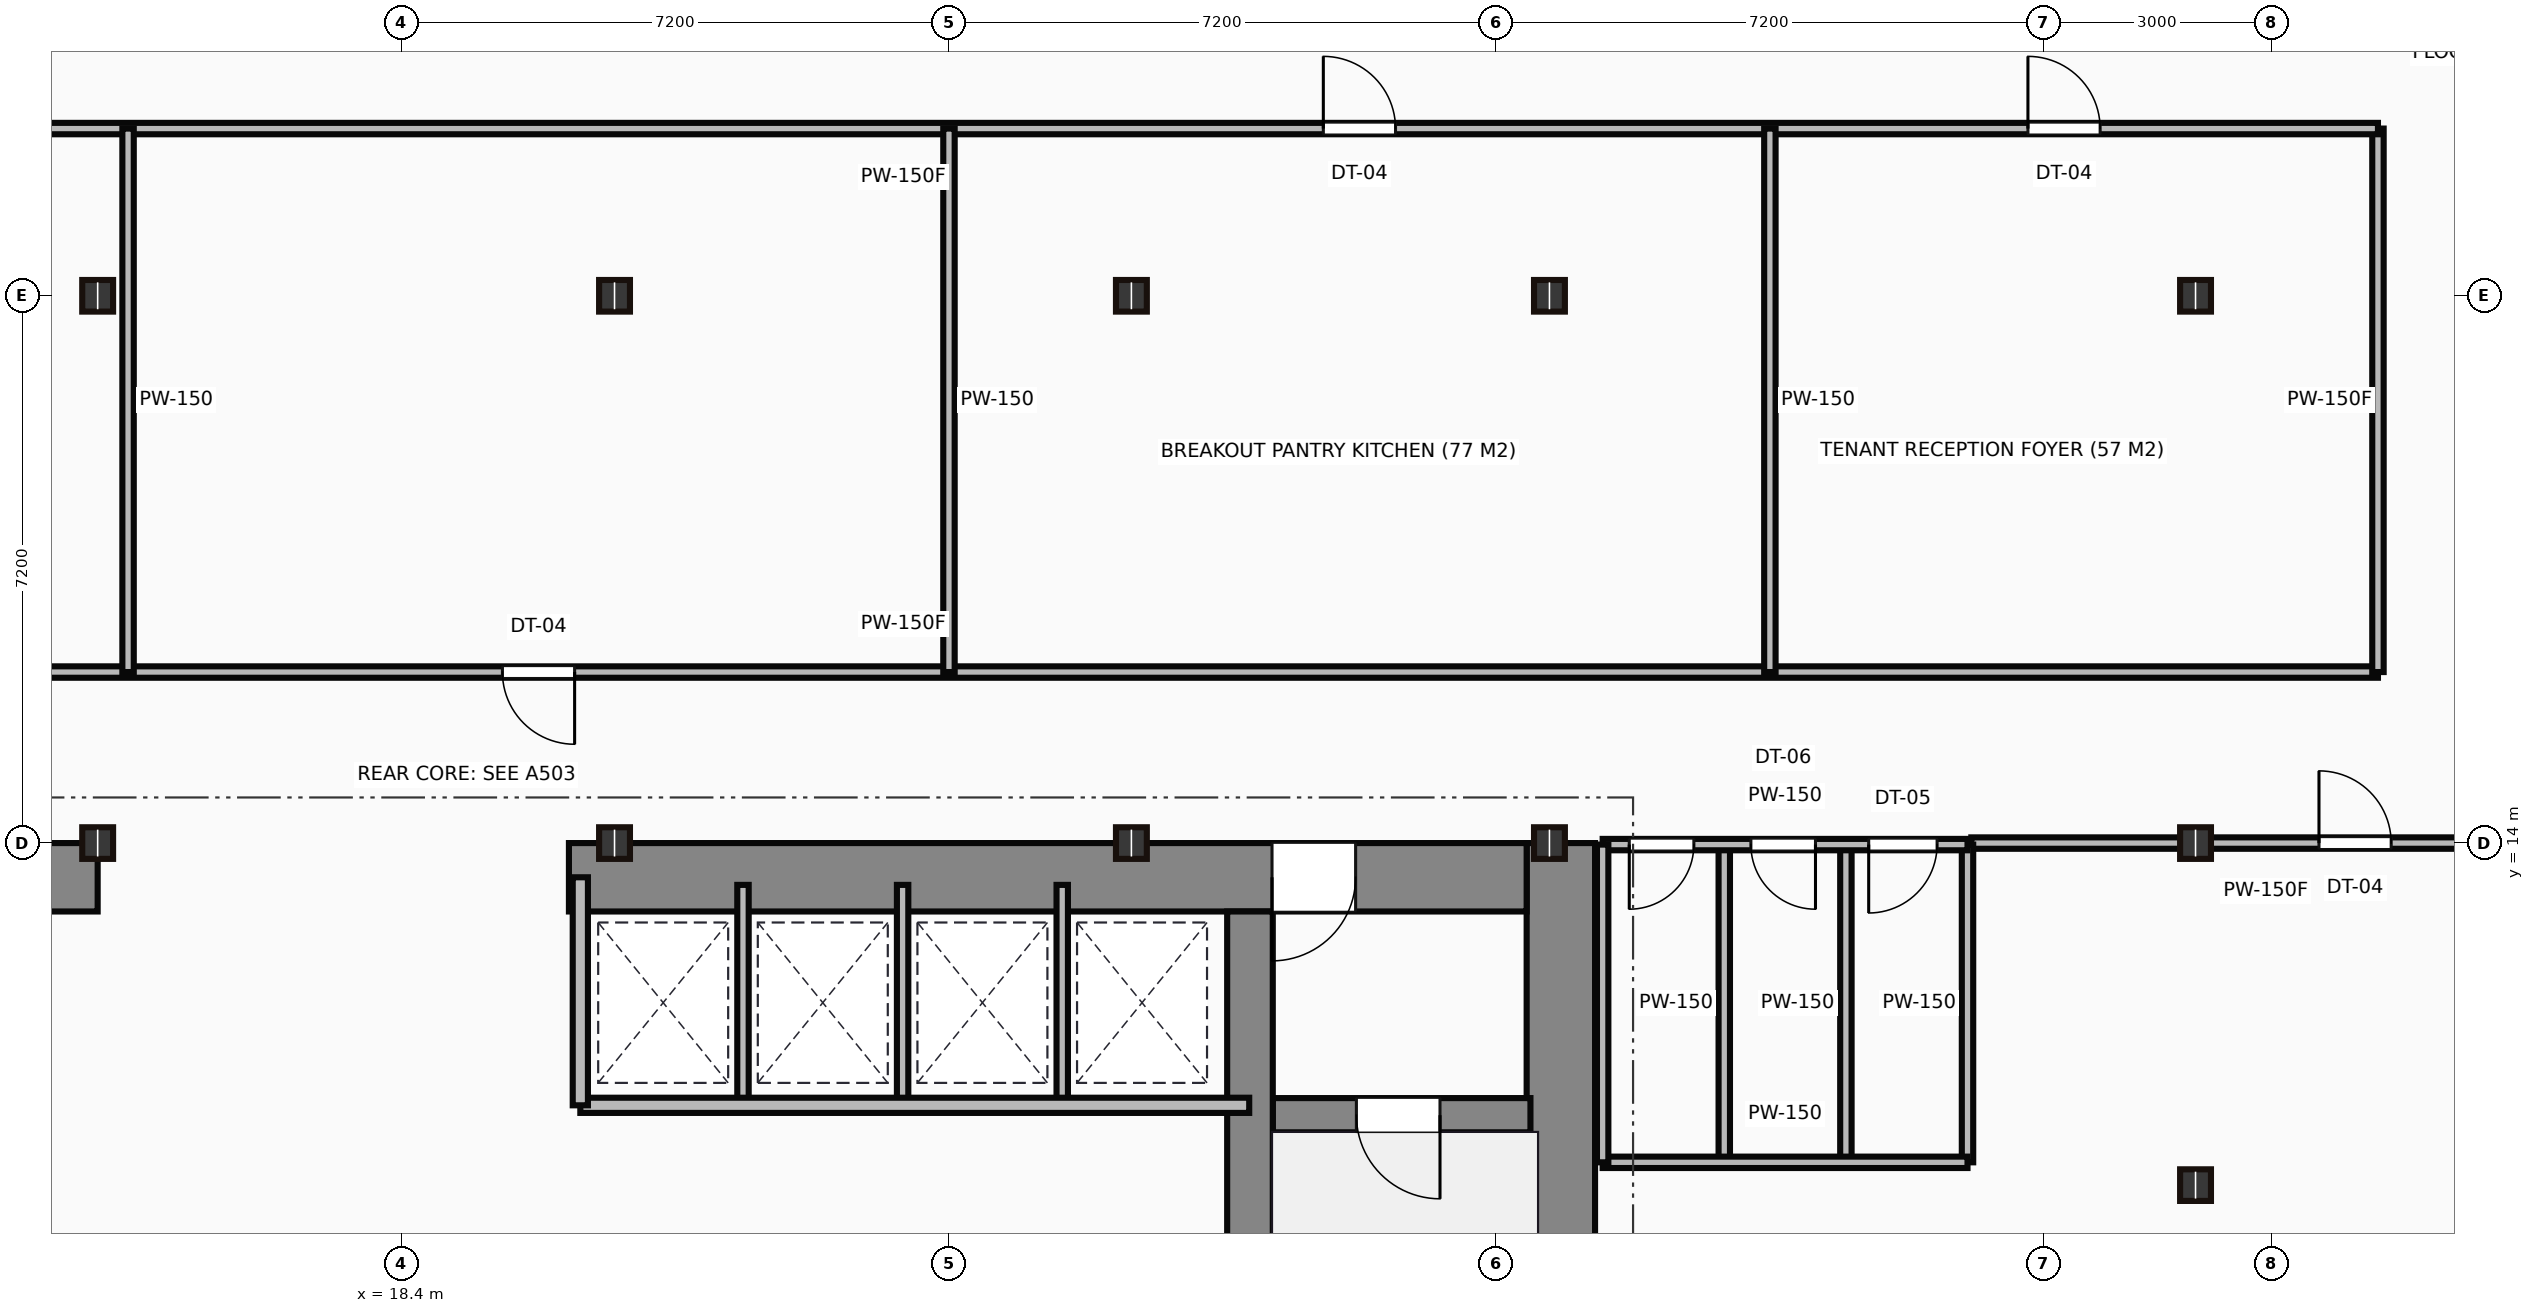
"""IFC4 building model, lengths in metres.
Left out: names, types, materials, properties, quantities, classifications, styles, units other than length and angle.
Written with IfcOpenShell. Run it as: python <this file> out.ifc"""

import sys

from ifc_helpers import new_model, si_unit, direction, frame, frame_2d, origin, origin_2d, place, context, subcontext, project, spatial, rectangle, i_section, extrude, source, transform, mapped, element, fill, save


model = new_model("IFC4")
c1 = context("Model", 3, precision=1e-05, world=origin(), true_north=direction((0.0, 1.0)))
c2 = subcontext(c1, "Body", "Model", "MODEL_VIEW")
j1 = project(units=[si_unit("LENGTHUNIT", "METRE"), si_unit("PLANEANGLEUNIT", "RADIAN")], contexts=[c1])
p1 = place(None, origin())
s1 = spatial("IfcSite", under=j1, at=p1, CompositionType="ELEMENT")
p2 = place(p1, origin())
s2 = spatial("IfcBuilding", under=s1, at=p2, CompositionType="ELEMENT")
p3 = place(p2, frame((0.0, 0.0, 50.75)))
s3 = spatial("IfcBuildingStorey", under=s2, at=p3, CompositionType="ELEMENT", Elevation=50.75)
m1 = source(origin(), c2, "Body", "SweptSolid", [
    extrude(rectangle(XDim=13.1, YDim=0.9, at=frame_2d((6.55, 0.0))), origin(), (0.0, 0.0, 1.0), 3.65),
])
p4 = place(p3, frame((33.65, 0.9, 0.0), z_axis=(0.0, 0.0, 1.0), x_axis=(0.0, 1.0, 0.0)))
e1 = element("IfcWall", 1, at=p4, inside=s3, PredefinedType="SHEAR", context=c2, shape_type="MappedRepresentation", body=[
    mapped(m1, transform((0.0, 0.0, 0.0))),
])
m2 = source(origin(), c2, "Body", "SweptSolid", [
    extrude(rectangle(XDim=9.1, YDim=0.9, at=frame_2d((4.55, 0.0))), origin(), (0.0, 0.0, 1.0), 3.65),
])
p5 = place(p3, frame((5.3, 13.55, 0.0), z_axis=(0.0, 0.0, 1.0), x_axis=(1.0, 0.0, 0.0)))
e2 = element("IfcWall", 2, at=p5, inside=s3, PredefinedType="SHEAR", context=c2, shape_type="MappedRepresentation", body=[
    mapped(m2, transform((0.0, 0.0, 0.0))),
])
p6 = place(p5, frame((4.1, 0.0, 0.0)))
e3 = element("IfcOpeningElement", 3, at=p6, cuts=e2, PredefinedType="OPENING", context=c2, shape_type="SweptSolid", body=[
    extrude(rectangle(XDim=1.1, YDim=2.15, at=frame_2d((0.55, 1.075))), frame((0.0, 0.46, 0.0), z_axis=(0.0, -1.0, 0.0), x_axis=(1.0, 0.0, 0.0)), (0.0, 0.0, 1.0), 0.92),
])
m3 = source(origin(), c2, "Body", "SweptSolid", [
    extrude(rectangle(XDim=12.6, YDim=0.9, at=frame_2d((6.3, 0.0))), origin(), (0.0, 0.0, 1.0), 3.65),
])
p7 = place(p3, frame((20.6, 13.55, 0.0), z_axis=(0.0, 0.0, 1.0), x_axis=(1.0, 0.0, 0.0)))
e4 = element("IfcWall", 4, at=p7, inside=s3, PredefinedType="SHEAR", context=c2, shape_type="MappedRepresentation", body=[
    mapped(m3, transform((0.0, 0.0, 0.0))),
])
p8 = place(p7, frame((9.25, 0.0, 0.0)))
e5 = element("IfcOpeningElement", 5, at=p8, cuts=e4, PredefinedType="OPENING", context=c2, shape_type="SweptSolid", body=[
    extrude(rectangle(XDim=1.1, YDim=2.15, at=frame_2d((0.55, 1.075))), frame((0.0, 0.46, 0.0), z_axis=(0.0, -1.0, 0.0), x_axis=(1.0, 0.0, 0.0)), (0.0, 0.0, 1.0), 0.92),
])
m4 = source(origin(), c2, "Body", "SweptSolid", [
    extrude(rectangle(XDim=12.2, YDim=0.6, at=frame_2d((6.1, 0.0))), origin(), (0.0, 0.0, 1.0), 3.65),
])
p9 = place(p3, frame((29.56, 0.9, 0.0), z_axis=(0.0, 0.0, 1.0), x_axis=(0.0, 1.0, 0.0)))
e6 = element("IfcWall", 6, at=p9, inside=s3, PredefinedType="SHEAR", context=c2, shape_type="MappedRepresentation", body=[
    mapped(m4, transform((0.0, 0.0, 0.0))),
])
m5 = source(origin(), c2, "Body", "SweptSolid", [
    extrude(rectangle(XDim=3.39, YDim=0.45, at=frame_2d((1.695, 0.0))), origin(), (0.0, 0.0, 1.0), 3.65),
])
p10 = place(p3, frame((29.86, 10.42, 0.0), z_axis=(0.0, 0.0, 1.0), x_axis=(1.0, 0.0, 0.0)))
e7 = element("IfcWall", 7, at=p10, inside=s3, PredefinedType="SHEAR", context=c2, shape_type="MappedRepresentation", body=[
    mapped(m5, transform((0.0, 0.0, 0.0))),
])
p11 = place(p10, frame((1.1, 0.0, 0.0)))
e8 = element("IfcOpeningElement", 8, at=p11, cuts=e7, PredefinedType="OPENING", context=c2, shape_type="SweptSolid", body=[
    extrude(rectangle(XDim=1.1, YDim=2.15, at=frame_2d((0.55, 1.075))), frame((0.0, 0.235, 0.0), z_axis=(0.0, -1.0, 0.0), x_axis=(1.0, 0.0, 0.0)), (0.0, 0.0, 1.0), 0.47),
])
m6 = source(origin(), c2, "Body", "SweptSolid", [
    extrude(i_section(OverallWidth=0.406, OverallDepth=0.416, WebThickness=0.03, FlangeThickness=0.048, at=origin_2d()), origin(), (0.0, 0.0, 1.0), 3.65),
])
for number, where, z_axis, x_axis in (
    (9, (14.4, 14.0, 0.0), (0.0, 0.0, 1.0), (1.0, 0.0, 0.0)),
    (10, (14.4, 21.2, 0.0), (0.0, 0.0, 1.0), (1.0, 0.0, 0.0)),
    (11, (21.2, 14.0, 0.0), (0.0, 0.0, 1.0), (1.0, 0.0, 0.0)),
    (12, (21.2, 21.2, 0.0), (0.0, 0.0, 1.0), (1.0, 0.0, 0.0)),
    (13, (28.0, 14.0, 0.0), (0.0, 0.0, 1.0), (1.0, 0.0, 0.0)),
    (14, (28.0, 21.2, 0.0), (0.0, 0.0, 1.0), (1.0, 0.0, 0.0)),
    (15, (33.5, 14.0, 0.0), (0.0, 0.0, 1.0), (1.0, 0.0, 0.0)),
    (16, (33.5, 21.2, 0.0), (0.0, 0.0, 1.0), (1.0, 0.0, 0.0)),
    (17, (42.0, 9.5, 0.0), (0.0, 0.0, 1.0), (1.0, 0.0, 0.0)),
    (18, (42.0, 14.0, 0.0), (0.0, 0.0, 1.0), (1.0, 0.0, 0.0)),
    (19, (42.0, 21.2, 0.0), (0.0, 0.0, 1.0), (1.0, 0.0, 0.0)),
):
    element("IfcColumn", number, at=place(p3, frame(where, z_axis=z_axis, x_axis=x_axis)), inside=s3, PredefinedType="COLUMN", context=c2, shape_type="MappedRepresentation", body=[
        mapped(m6, transform((0.0, 0.0, 0.0))),
    ])
m7 = source(origin(), c2, "Body", "SweptSolid", [
    extrude(rectangle(XDim=8.8, YDim=0.2, at=frame_2d((4.4, 0.0))), origin(), (0.0, 0.0, 1.0), 3.4),
])
p12 = place(p3, frame((20.75, 10.55, 0.0), z_axis=(0.0, 0.0, 1.0), x_axis=(1.0, 0.0, 0.0)))
e20 = element("IfcWall", 20, at=p12, inside=s3, PredefinedType="PARTITIONING", context=c2, shape_type="MappedRepresentation", body=[
    mapped(m7, transform((0.0, 0.0, 0.0))),
])
m8 = source(origin(), c2, "Body", "SweptSolid", [
    extrude(rectangle(XDim=3.0, YDim=0.2, at=frame_2d((1.5, 0.0))), origin(), (0.0, 0.0, 1.0), 3.4),
])
p13 = place(p3, frame((20.75, 10.55, 0.0), z_axis=(0.0, 0.0, 1.0), x_axis=(0.0, 1.0, 0.0)))
e21 = element("IfcWall", 21, at=p13, inside=s3, PredefinedType="PARTITIONING", context=c2, shape_type="MappedRepresentation", body=[
    mapped(m8, transform((0.0, 0.0, 0.0))),
])
m9 = source(origin(), c2, "Body", "SweptSolid", [
    extrude(rectangle(XDim=2.85, YDim=0.15, at=frame_2d((1.425, 0.0))), origin(), (0.0, 0.0, 1.0), 3.4),
])
for number, where, z_axis, x_axis in (
    (22, (22.89, 10.6, 0.0), (0.0, 0.0, 1.0), (0.0, 1.0, 0.0)),
    (23, (24.99, 10.6, 0.0), (0.0, 0.0, 1.0), (0.0, 1.0, 0.0)),
    (24, (27.09, 10.6, 0.0), (0.0, 0.0, 1.0), (0.0, 1.0, 0.0)),
):
    element("IfcWall", number, at=place(p3, frame(where, z_axis=z_axis, x_axis=x_axis)), inside=s3, PredefinedType="PARTITIONING", context=c2, shape_type="MappedRepresentation", body=[
        mapped(m9, transform((0.0, 0.0, 0.0))),
    ])
m10 = source(origin(), c2, "Body", "SweptSolid", [
    extrude(rectangle(XDim=4.8, YDim=0.15, at=frame_2d((2.4, 0.0))), origin(), (0.0, 0.0, 1.0), 2.625),
])
p14 = place(p3, frame((34.2, 13.98, 0.0), z_axis=(0.0, 0.0, 1.0), x_axis=(1.0, 0.0, 0.0)))
e25 = element("IfcWall", 25, at=p14, inside=s3, PredefinedType="PARTITIONING", context=c2, shape_type="MappedRepresentation", body=[
    mapped(m10, transform((0.0, 0.0, 0.0))),
])
p15 = place(p14, frame((0.35, 0.0, 0.0)))
e26 = element("IfcOpeningElement", 26, at=p15, cuts=e25, PredefinedType="OPENING", context=c2, shape_type="SweptSolid", body=[
    extrude(rectangle(XDim=0.85, YDim=2.1, at=frame_2d((0.425, 1.05))), frame((0.0, 0.085, 0.0), z_axis=(0.0, -1.0, 0.0), x_axis=(1.0, 0.0, 0.0)), (0.0, 0.0, 1.0), 0.17),
])
p16 = place(p14, frame((1.95, 0.0, 0.0)))
e27 = element("IfcOpeningElement", 27, at=p16, cuts=e25, PredefinedType="OPENING", context=c2, shape_type="SweptSolid", body=[
    extrude(rectangle(XDim=0.85, YDim=2.1, at=frame_2d((0.425, 1.05))), frame((0.0, 0.085, 0.0), z_axis=(0.0, -1.0, 0.0), x_axis=(1.0, 0.0, 0.0)), (0.0, 0.0, 1.0), 0.17),
])
p17 = place(p14, frame((3.5, 0.0, 0.0)))
e28 = element("IfcOpeningElement", 28, at=p17, cuts=e25, PredefinedType="OPENING", context=c2, shape_type="SweptSolid", body=[
    extrude(rectangle(XDim=0.9, YDim=2.1, at=frame_2d((0.45, 1.05))), frame((0.0, 0.085, 0.0), z_axis=(0.0, -1.0, 0.0), x_axis=(1.0, 0.0, 0.0)), (0.0, 0.0, 1.0), 0.17),
])
m11 = source(origin(), c2, "Body", "SweptSolid", [
    extrude(rectangle(XDim=4.8, YDim=0.15, at=frame_2d((2.4, 0.0))), origin(), (0.0, 0.0, 1.0), 3.4),
])
p18 = place(p3, frame((34.2, 9.8, 0.0), z_axis=(0.0, 0.0, 1.0), x_axis=(1.0, 0.0, 0.0)))
e29 = element("IfcWall", 29, at=p18, inside=s3, PredefinedType="PARTITIONING", context=c2, shape_type="MappedRepresentation", body=[
    mapped(m11, transform((0.0, 0.0, 0.0))),
])
m12 = source(origin(), c2, "Body", "SweptSolid", [
    extrude(rectangle(XDim=4.18, YDim=0.15, at=frame_2d((2.09, 0.0))), origin(), (0.0, 0.0, 1.0), 3.4),
])
for number, where, z_axis, x_axis in (
    (30, (39.0, 9.8, 0.0), (0.0, 0.0, 1.0), (0.0, 1.0, 0.0)),
    (31, (34.2, 9.8, 0.0), (0.0, 0.0, 1.0), (0.0, 1.0, 0.0)),
    (32, (35.8, 9.8, 0.0), (0.0, 0.0, 1.0), (0.0, 1.0, 0.0)),
    (33, (37.4, 9.8, 0.0), (0.0, 0.0, 1.0), (0.0, 1.0, 0.0)),
):
    element("IfcWall", number, at=place(p3, frame(where, z_axis=z_axis, x_axis=x_axis)), inside=s3, PredefinedType="PARTITIONING", context=c2, shape_type="MappedRepresentation", body=[
        mapped(m12, transform((0.0, 0.0, 0.0))),
    ])
m13 = source(origin(), c2, "Body", "SweptSolid", [
    extrude(rectangle(XDim=7.75, YDim=0.15, at=frame_2d((3.875, 0.0))), origin(), (0.0, 0.0, 1.0), 2.625),
])
p19 = place(p3, frame((46.8, 14.0, 0.0), z_axis=(0.0, 0.0, 1.0), x_axis=(-1.0, 0.0, 0.0)))
e34 = element("IfcWall", 34, at=p19, inside=s3, PredefinedType="PARTITIONING", context=c2, shape_type="MappedRepresentation", body=[
    mapped(m13, transform((0.0, 0.0, 0.0))),
])
p20 = place(p19, frame((2.226, 0.0, 0.0)))
e35 = element("IfcOpeningElement", 35, at=p20, cuts=e34, PredefinedType="OPENING", context=c2, shape_type="SweptSolid", body=[
    extrude(rectangle(XDim=0.95, YDim=2.15, at=frame_2d((0.475, 1.075))), frame((0.0, 0.085, 0.0), z_axis=(0.0, -1.0, 0.0), x_axis=(1.0, 0.0, 0.0)), (0.0, 0.0, 1.0), 0.17),
])
m14 = source(origin(), c2, "Body", "SweptSolid", [
    extrude(rectangle(XDim=38.8, YDim=0.15, at=frame_2d((19.4, 0.0))), origin(), (0.0, 0.0, 1.0), 3.4),
])
p21 = place(p3, frame((5.6, 16.25, 0.0), z_axis=(0.0, 0.0, 1.0), x_axis=(1.0, 0.0, 0.0)))
e36 = element("IfcWall", 36, at=p21, inside=s3, PredefinedType="PARTITIONING", context=c2, shape_type="MappedRepresentation", body=[
    mapped(m14, transform((0.0, 0.0, 0.0))),
])
p22 = place(p21, frame((4.255, 0.0, 0.0)))
e37 = element("IfcOpeningElement", 37, at=p22, cuts=e36, PredefinedType="OPENING", context=c2, shape_type="SweptSolid", body=[
    extrude(rectangle(XDim=0.95, YDim=2.15, at=frame_2d((0.475, 1.075))), frame((0.0, 0.085, 0.0), z_axis=(0.0, -1.0, 0.0), x_axis=(1.0, 0.0, 0.0)), (0.0, 0.0, 1.0), 0.17),
])
p23 = place(p21, frame((14.125, 0.0, 0.0)))
e38 = element("IfcOpeningElement", 38, at=p23, cuts=e36, PredefinedType="OPENING", context=c2, shape_type="SweptSolid", body=[
    extrude(rectangle(XDim=0.95, YDim=2.15, at=frame_2d((0.475, 1.075))), frame((0.0, 0.085, 0.0), z_axis=(0.0, -1.0, 0.0), x_axis=(1.0, 0.0, 0.0)), (0.0, 0.0, 1.0), 0.17),
])
m15 = source(origin(), c2, "Body", "SweptSolid", [
    extrude(rectangle(XDim=7.15, YDim=0.15, at=frame_2d((3.575, 0.0))), origin(), (0.0, 0.0, 1.0), 3.4),
])
p24 = place(p3, frame((44.4, 16.25, 0.0), z_axis=(0.0, 0.0, 1.0), x_axis=(0.0, 1.0, 0.0)))
e39 = element("IfcWall", 39, at=p24, inside=s3, PredefinedType="PARTITIONING", context=c2, shape_type="MappedRepresentation", body=[
    mapped(m15, transform((0.0, 0.0, 0.0))),
])
m16 = source(origin(), c2, "Body", "SweptSolid", [
    extrude(rectangle(XDim=38.8, YDim=0.15, at=frame_2d((19.4, 0.0))), origin(), (0.0, 0.0, 1.0), 2.978),
])
p25 = place(p3, frame((44.4, 23.4, 0.0), z_axis=(0.0, 0.0, 1.0), x_axis=(-1.0, 0.0, 0.0)))
e40 = element("IfcWall", 40, at=p25, inside=s3, PredefinedType="PARTITIONING", context=c2, shape_type="MappedRepresentation", body=[
    mapped(m16, transform((0.0, 0.0, 0.0))),
])
p26 = place(p25, frame((12.925, 0.0, 0.0)))
e41 = element("IfcOpeningElement", 41, at=p26, cuts=e40, PredefinedType="OPENING", context=c2, shape_type="SweptSolid", body=[
    extrude(rectangle(XDim=0.95, YDim=2.15, at=frame_2d((0.475, 1.075))), frame((0.0, 0.085, 0.0), z_axis=(0.0, -1.0, 0.0), x_axis=(1.0, 0.0, 0.0)), (0.0, 0.0, 1.0), 0.17),
])
p27 = place(p25, frame((3.655, 0.0, 0.0)))
e42 = element("IfcOpeningElement", 42, at=p27, cuts=e40, PredefinedType="OPENING", context=c2, shape_type="SweptSolid", body=[
    extrude(rectangle(XDim=0.95, YDim=2.15, at=frame_2d((0.475, 1.075))), frame((0.0, 0.085, 0.0), z_axis=(0.0, -1.0, 0.0), x_axis=(1.0, 0.0, 0.0)), (0.0, 0.0, 1.0), 0.17),
])
for number, where, z_axis, x_axis in (
    (43, (14.8, 23.4, 0.0), (0.0, 0.0, 1.0), (0.0, -1.0, 0.0)),
    (44, (25.6, 23.4, 0.0), (0.0, 0.0, 1.0), (0.0, -1.0, 0.0)),
    (45, (36.4, 23.4, 0.0), (0.0, 0.0, 1.0), (0.0, -1.0, 0.0)),
):
    element("IfcWall", number, at=place(p3, frame(where, z_axis=z_axis, x_axis=x_axis)), inside=s3, PredefinedType="PARTITIONING", context=c2, shape_type="MappedRepresentation", body=[
        mapped(m15, transform((0.0, 0.0, 0.0))),
    ])
m17 = source(origin(), c2, "Body", "SweptSolid", [
    extrude(rectangle(XDim=1.1, YDim=2.15, at=frame_2d((0.55, 1.075))), frame((0.0, 0.025, 0.0), z_axis=(0.0, -1.0, 0.0), x_axis=(1.0, 0.0, 0.0)), (0.0, 0.0, 1.0), 0.05),
])
p28 = place(p11, frame((1.1, 0.0, 0.0), z_axis=(0.0, 0.0, 1.0), x_axis=(-1.0, 0.0, 0.0)))
e46 = element("IfcDoor", 46, at=p28, inside=s3, OperationType="SINGLE_SWING_RIGHT", PredefinedType="DOOR", context=c2, shape_type="MappedRepresentation", body=[
    mapped(m17, transform((0.0, 0.0, 0.0))),
])
fill(e8, e46)
p29 = place(p8, origin())
e47 = element("IfcDoor", 47, at=p29, inside=s3, OperationType="SINGLE_SWING_LEFT", PredefinedType="DOOR", context=c2, shape_type="MappedRepresentation", body=[
    mapped(m17, transform((0.0, 0.0, 0.0))),
])
fill(e5, e47)
m18 = source(origin(), c2, "Body", "SweptSolid", [
    extrude(rectangle(XDim=0.85, YDim=2.1, at=frame_2d((0.425, 1.05))), frame((0.0, 0.025, 0.0), z_axis=(0.0, -1.0, 0.0), x_axis=(1.0, 0.0, 0.0)), (0.0, 0.0, 1.0), 0.05),
])
p30 = place(p15, frame((0.85, 0.0, 0.0), z_axis=(0.0, 0.0, 1.0), x_axis=(-1.0, 0.0, 0.0)))
e48 = element("IfcDoor", 48, at=p30, inside=s3, OperationType="SINGLE_SWING_LEFT", PredefinedType="DOOR", context=c2, shape_type="MappedRepresentation", body=[
    mapped(m18, transform((0.0, 0.0, 0.0))),
])
fill(e26, e48)
p31 = place(p16, frame((0.85, 0.0, 0.0), z_axis=(0.0, 0.0, 1.0), x_axis=(-1.0, 0.0, 0.0)))
e49 = element("IfcDoor", 49, at=p31, inside=s3, OperationType="SINGLE_SWING_RIGHT", PredefinedType="DOOR", context=c2, shape_type="MappedRepresentation", body=[
    mapped(m18, transform((0.0, 0.0, 0.0))),
])
fill(e27, e49)
m19 = source(origin(), c2, "Body", "SweptSolid", [
    extrude(rectangle(XDim=0.9, YDim=2.1, at=frame_2d((0.45, 1.05))), frame((0.0, 0.025, 0.0), z_axis=(0.0, -1.0, 0.0), x_axis=(1.0, 0.0, 0.0)), (0.0, 0.0, 1.0), 0.05),
])
p32 = place(p17, frame((0.9, 0.0, 0.0), z_axis=(0.0, 0.0, 1.0), x_axis=(-1.0, 0.0, 0.0)))
e50 = element("IfcDoor", 50, at=p32, inside=s3, OperationType="SINGLE_SWING_LEFT", PredefinedType="DOOR", context=c2, shape_type="MappedRepresentation", body=[
    mapped(m19, transform((0.0, 0.0, 0.0))),
])
fill(e28, e50)
m20 = source(origin(), c2, "Body", "SweptSolid", [
    extrude(rectangle(XDim=0.95, YDim=2.15, at=frame_2d((0.475, 1.075))), frame((0.0, 0.025, 0.0), z_axis=(0.0, -1.0, 0.0), x_axis=(1.0, 0.0, 0.0)), (0.0, 0.0, 1.0), 0.05),
])
p33 = place(p23, origin())
e51 = element("IfcDoor", 51, at=p33, inside=s3, OperationType="SINGLE_SWING_RIGHT", PredefinedType="DOOR", context=c2, shape_type="MappedRepresentation", body=[
    mapped(m20, transform((0.0, 0.0, 0.0))),
])
fill(e38, e51)
p34 = place(p26, origin())
e52 = element("IfcDoor", 52, at=p34, inside=s3, OperationType="SINGLE_SWING_RIGHT", PredefinedType="DOOR", context=c2, shape_type="MappedRepresentation", body=[
    mapped(m20, transform((0.0, 0.0, 0.0))),
])
fill(e41, e52)
p35 = place(p27, origin())
e53 = element("IfcDoor", 53, at=p35, inside=s3, OperationType="SINGLE_SWING_RIGHT", PredefinedType="DOOR", context=c2, shape_type="MappedRepresentation", body=[
    mapped(m20, transform((0.0, 0.0, 0.0))),
])
fill(e42, e53)
p36 = place(p20, origin())
e54 = element("IfcDoor", 54, at=p36, inside=s3, OperationType="SINGLE_SWING_RIGHT", PredefinedType="DOOR", context=c2, shape_type="MappedRepresentation", body=[
    mapped(m20, transform((0.0, 0.0, 0.0))),
])
fill(e35, e54)
save(model, sys.argv[1])
